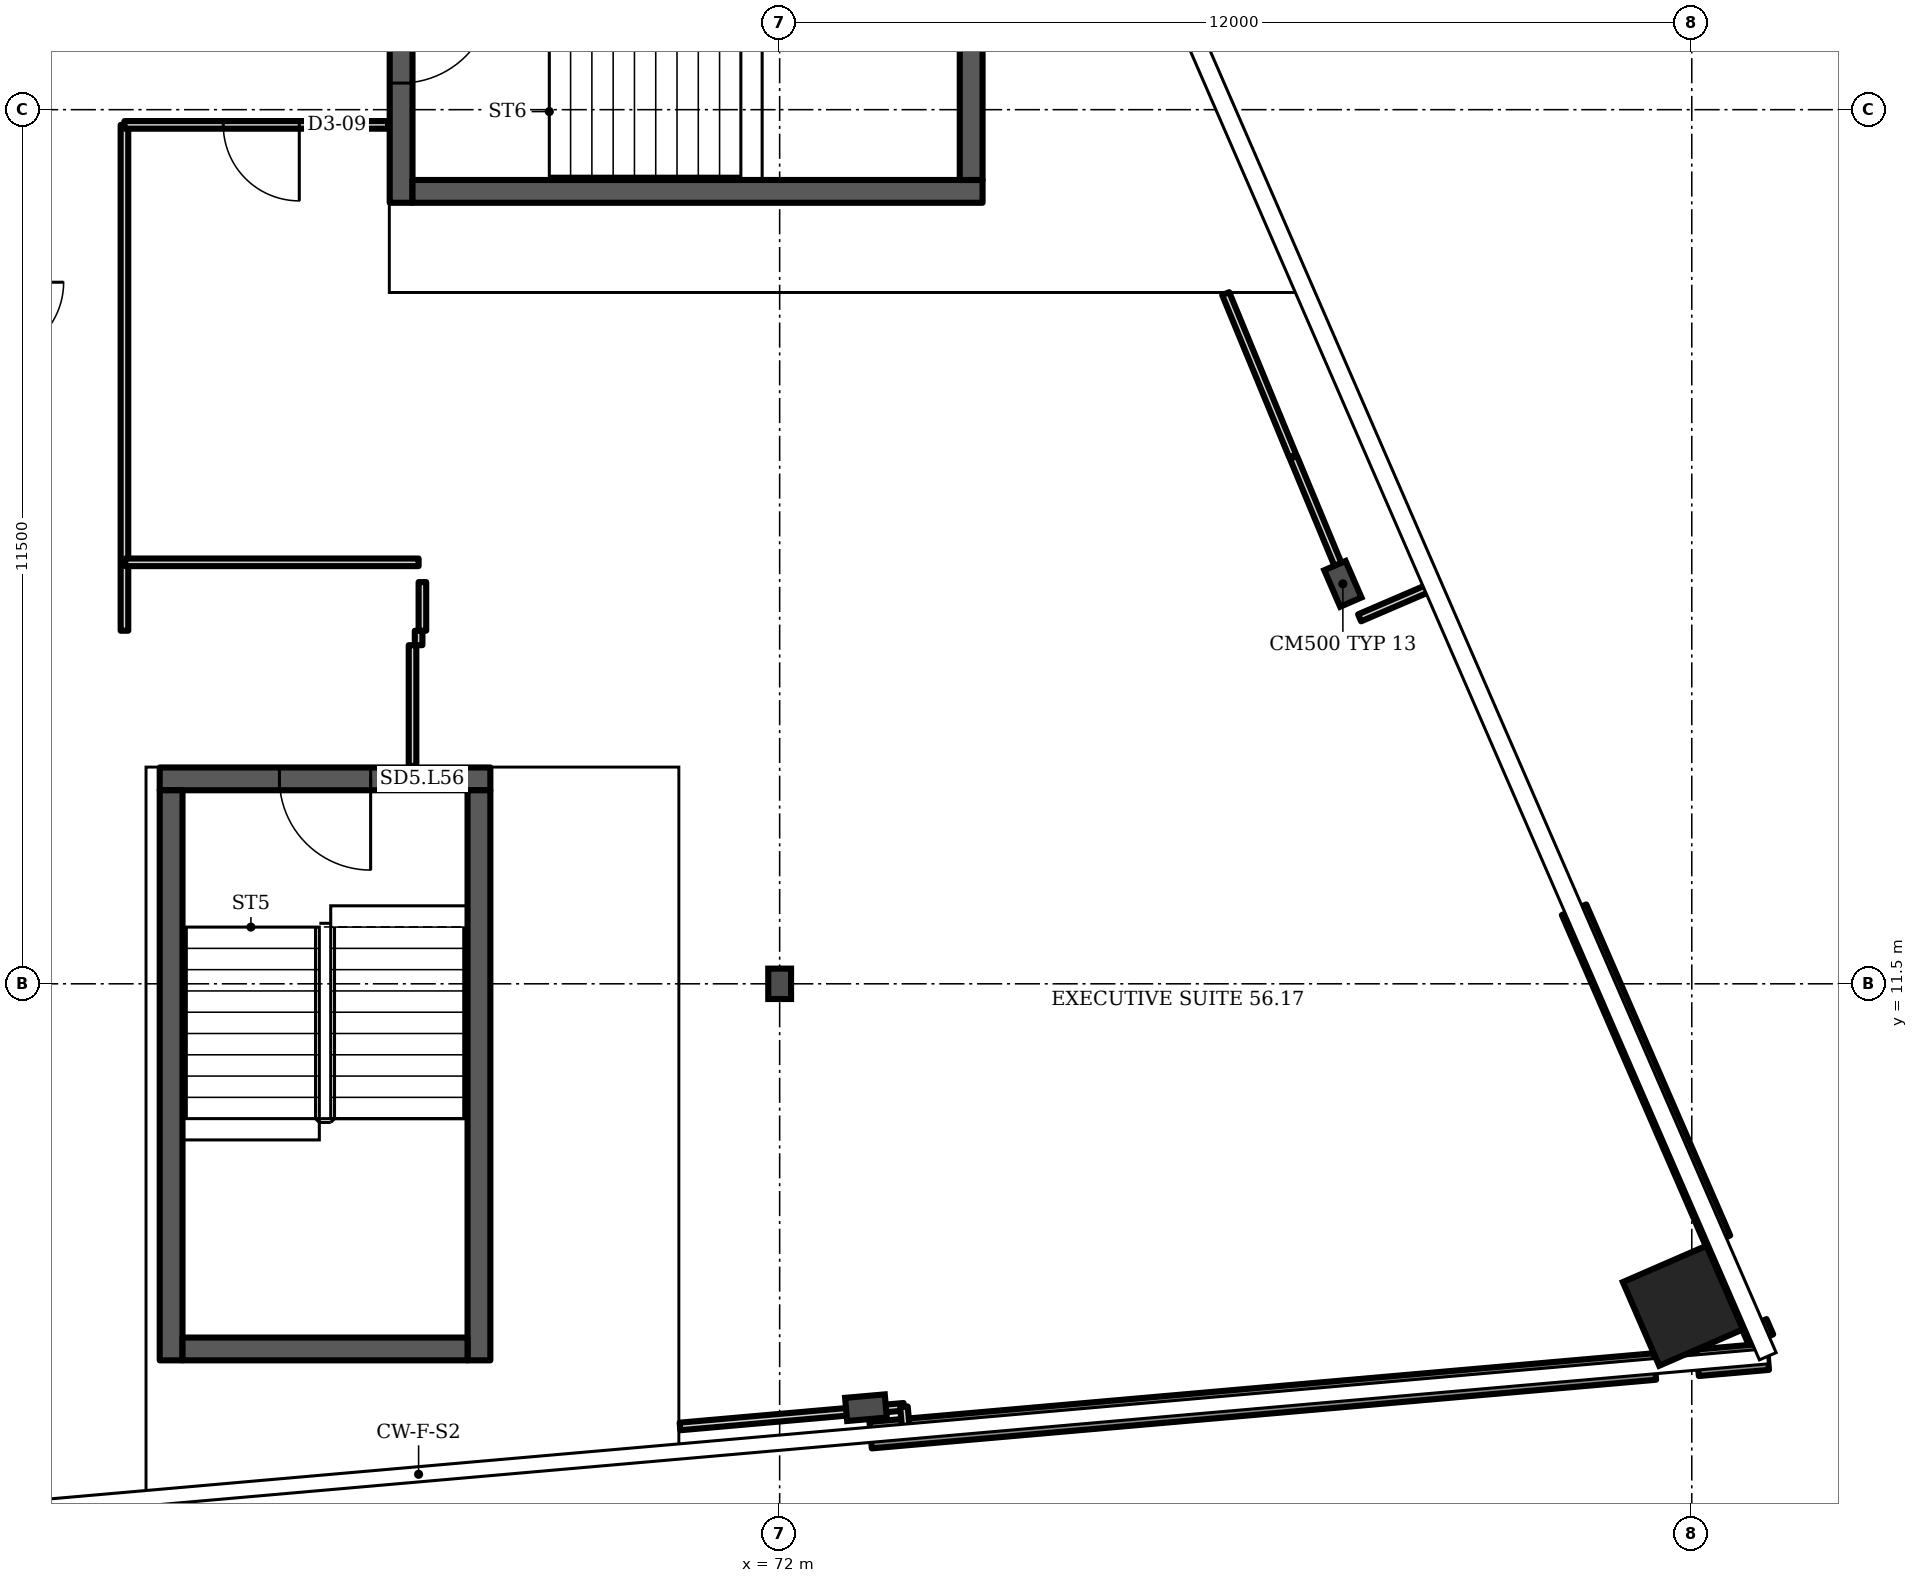
"""IFC4 building model, lengths in metres.
Left out: names, types, materials, properties, quantities, classifications, styles, units other than length and angle.
Written with IfcOpenShell. Run it as: python <this file> out.ifc"""

import sys

from ifc_helpers import new_model, si_unit, direction, frame, frame_2d, origin, origin_2d, place, context, subcontext, project, spatial, rectangle, i_section, extrude, element, fill, save


model = new_model("IFC4")
c1 = context("Model", 3, precision=1e-05, world=origin(), true_north=direction((0.0, 1.0)))
c2 = subcontext(c1, "Body", "Model", "MODEL_VIEW")
j1 = project(units=[si_unit("LENGTHUNIT", "METRE"), si_unit("PLANEANGLEUNIT", "RADIAN")], contexts=[c1])
p1 = place(None, origin())
s1 = spatial("IfcSite", under=j1, at=p1, CompositionType="ELEMENT")
p2 = place(p1, origin())
s2 = spatial("IfcBuilding", under=s1, at=p2, CompositionType="ELEMENT")
p3 = place(p2, frame((0.0, 0.0, 225.1)))
s3 = spatial("IfcBuildingStorey", under=s2, at=p3, CompositionType="ELEMENT", Elevation=225.1)
p4 = place(p3, frame((83.883, 7.265, 0.0), z_axis=(0.0, 0.0, 1.0), x_axis=(-0.398727, 0.917072, 0.0)))
e1 = element("IfcColumn", 1, at=p4, inside=s3, PredefinedType="COLUMN", context=c2, shape_type="SweptSolid", body=[
    extrude(rectangle(XDim=1.2, YDim=1.2, at=origin_2d()), origin(), (0.0, 0.0, 1.0), 3.6),
])
for number, where, z_axis, x_axis in (
    (2, (73.135, 5.923, 0.0), (0.0, 0.0, 1.0), (0.087, -0.996, 0.0)),
    (3, (79.41, 16.762, 0.0), (0.0, 0.0, 1.0), (0.917, 0.399, 0.0)),
):
    element("IfcColumn", number, at=place(p3, frame(where, z_axis=z_axis, x_axis=x_axis)), inside=s3, PredefinedType="COLUMN", context=c2, shape_type="SweptSolid", body=[
        extrude(i_section(OverallWidth=0.306, OverallDepth=0.524, WebThickness=0.021, FlangeThickness=0.04, FilletRadius=0.027, at=origin_2d()), origin(), (0.0, 0.0, 1.0), 3.6),
    ])
p5 = place(p3, frame((72.0, 11.5, 0.0), z_axis=(0.0, 0.0, 1.0), x_axis=(1.0, 0.0, 0.0)))
e4 = element("IfcColumn", 4, at=p5, inside=s3, PredefinedType="COLUMN", context=c2, shape_type="SweptSolid", body=[
    extrude(i_section(OverallWidth=0.3, OverallDepth=0.4, WebThickness=0.013, FlangeThickness=0.024, FilletRadius=0.027, at=origin_2d()), origin(), (0.0, 0.0, 1.0), 3.6),
])
p6 = place(p3, frame((73.197, 5.562, 0.0), z_axis=(0.0, 0.0, 1.0), x_axis=(0.996198, 0.087163, 0.0)))
e5 = element("IfcWall", 5, at=p6, inside=s3, PredefinedType="SOLIDWALL", context=c2, shape_type="SweptSolid", body=[
    extrude(rectangle(XDim=10.358, YDim=0.35, at=frame_2d((5.179, 0.0))), origin(), (0.0, 0.0, 1.0), 1.0),
])
p7 = place(p3, frame((84.078, 6.514, 0.0), z_axis=(0.0, 0.0, 1.0), x_axis=(0.996213, 0.086971, 0.0)))
e6 = element("IfcWall", 6, at=p7, inside=s3, PredefinedType="SOLIDWALL", context=c2, shape_type="SweptSolid", body=[
    extrude(rectangle(XDim=0.926, YDim=0.35, at=frame_2d((0.463, 0.0))), origin(), (0.0, 0.0, 1.0), 1.0),
])
p8 = place(p3, frame((84.91, 6.819, 0.0), z_axis=(0.0, 0.0, 1.0), x_axis=(-0.398359, 0.91723, 0.0)))
e7 = element("IfcWall", 7, at=p8, inside=s3, PredefinedType="SOLIDWALL", context=c2, shape_type="SweptSolid", body=[
    extrude(rectangle(XDim=0.219, YDim=0.35, at=frame_2d((0.109, 0.0))), origin(), (0.0, 0.0, 1.0), 1.0),
])
p9 = place(p3, frame((84.345, 8.12, 0.0), z_axis=(0.0, 0.0, 1.0), x_axis=(-0.398736, 0.917067, 0.0)))
e8 = element("IfcWall", 8, at=p9, inside=s3, PredefinedType="SOLIDWALL", context=c2, shape_type="SweptSolid", body=[
    extrude(rectangle(XDim=4.748, YDim=0.35, at=frame_2d((2.374, 0.0))), origin(), (0.0, 0.0, 1.0), 1.0),
])
p10 = place(p3, frame((63.844, 14.196, 0.0), z_axis=(0.0, 0.0, 1.0), x_axis=(1.0, 0.0, 0.0)))
e9 = element("IfcWall", 9, at=p10, inside=s3, PredefinedType="SHEAR", context=c2, shape_type="SweptSolid", body=[
    extrude(rectangle(XDim=4.35, YDim=0.3, at=frame_2d((2.175, 0.0))), origin(), (0.0, 0.0, 1.0), 3.2),
])
p11 = place(p10, frame((1.575, 0.0, 0.0)))
e10 = element("IfcOpeningElement", 10, at=p11, cuts=e9, PredefinedType="OPENING", context=c2, shape_type="SweptSolid", body=[
    extrude(rectangle(XDim=1.2, YDim=2.1, at=frame_2d((0.6, 1.05))), frame((0.0, 0.16, 0.0), z_axis=(0.0, -1.0, 0.0), x_axis=(1.0, 0.0, 0.0)), (0.0, 0.0, 1.0), 0.32),
])
p12 = place(p3, frame((67.02, 21.775, 0.0), z_axis=(0.0, 0.0, 1.0), x_axis=(0.0, 1.0, 0.0)))
e11 = element("IfcWall", 11, at=p12, inside=s3, PredefinedType="SHEAR", context=c2, shape_type="SweptSolid", body=[
    extrude(rectangle(XDim=4.35, YDim=0.3, at=frame_2d((2.175, 0.0))), origin(), (0.0, 0.0, 1.0), 3.2),
])
p13 = place(p12, frame((1.575, 0.0, 0.0)))
e12 = element("IfcOpeningElement", 12, at=p13, cuts=e11, PredefinedType="OPENING", context=c2, shape_type="SweptSolid", body=[
    extrude(rectangle(XDim=1.2, YDim=2.1, at=frame_2d((0.6, 1.05))), frame((0.0, 0.16, 0.0), z_axis=(0.0, -1.0, 0.0), x_axis=(1.0, 0.0, 0.0)), (0.0, 0.0, 1.0), 0.32),
])
p14 = place(p3, frame((63.38, 16.145, 0.0), z_axis=(0.0, 0.0, 1.0), x_axis=(0.0, 1.0, 0.0)))
e13 = element("IfcWall", 13, at=p14, inside=s3, PredefinedType="PARTITIONING", context=c2, shape_type="SweptSolid", body=[
    extrude(rectangle(XDim=6.655, YDim=0.1, at=frame_2d((3.328, 0.0))), origin(), (0.0, 0.0, 1.0), 3.2),
])
p15 = place(p3, frame((63.38, 22.8, 0.0), z_axis=(0.0, 0.0, 1.0), x_axis=(1.0, 0.0, 0.0)))
e14 = element("IfcWall", 14, at=p15, inside=s3, PredefinedType="PARTITIONING", context=c2, shape_type="SweptSolid", body=[
    extrude(rectangle(XDim=3.47, YDim=0.1, at=frame_2d((1.735, 0.0))), origin(), (0.0, 0.0, 1.0), 3.2),
])
p16 = place(p15, frame((1.3, 0.0, 0.0)))
e15 = element("IfcOpeningElement", 15, at=p16, cuts=e14, PredefinedType="OPENING", context=c2, shape_type="SweptSolid", body=[
    extrude(rectangle(XDim=1.0, YDim=2.1, at=frame_2d((0.5, 1.05))), frame((0.0, 0.06, 0.0), z_axis=(0.0, -1.0, 0.0), x_axis=(1.0, 0.0, 0.0)), (0.0, 0.0, 1.0), 0.12),
])
p17 = place(p3, frame((63.39, 17.045, 0.0), z_axis=(0.0, 0.0, 1.0), x_axis=(1.0, 0.0, 0.0)))
e16 = element("IfcWall", 16, at=p17, inside=s3, PredefinedType="PARTITIONING", context=c2, shape_type="SweptSolid", body=[
    extrude(rectangle(XDim=3.86, YDim=0.1, at=frame_2d((1.93, 0.0))), origin(), (0.0, 0.0, 1.0), 3.2),
])
p18 = place(p3, frame((67.17, 14.366, 0.0), z_axis=(0.0, 0.0, 1.0), x_axis=(0.0, 1.0, 0.0)))
e17 = element("IfcWall", 17, at=p18, inside=s3, PredefinedType="PARTITIONING", context=c2, shape_type="SweptSolid", body=[
    extrude(rectangle(XDim=1.589, YDim=0.1, at=frame_2d((0.794, 0.0))), origin(), (0.0, 0.0, 1.0), 3.2),
])
p19 = place(p3, frame((67.25, 15.955, 0.0), z_axis=(0.0, 0.0, 1.0), x_axis=(0.0, 1.0, 0.0)))
e18 = element("IfcWall", 18, at=p19, inside=s3, PredefinedType="PARTITIONING", context=c2, shape_type="SweptSolid", body=[
    extrude(rectangle(XDim=0.19, YDim=0.1, at=frame_2d((0.095, 0.0))), origin(), (0.0, 0.0, 1.0), 3.2),
])
p20 = place(p3, frame((67.3, 16.145, 0.0), z_axis=(0.0, 0.0, 1.0), x_axis=(0.0, 1.0, 0.0)))
e19 = element("IfcWall", 19, at=p20, inside=s3, PredefinedType="PARTITIONING", context=c2, shape_type="SweptSolid", body=[
    extrude(rectangle(XDim=0.64, YDim=0.1, at=frame_2d((0.32, 0.0))), origin(), (0.0, 0.0, 1.0), 3.2),
])
p21 = place(p3, frame((70.689, 5.677, 0.0), z_axis=(0.0, 0.0, 1.0), x_axis=(0.996174, 0.087417, 0.0)))
e20 = element("IfcWall", 20, at=p21, inside=s3, PredefinedType="PARTITIONING", context=c2, shape_type="SweptSolid", body=[
    extrude(rectangle(XDim=2.958, YDim=0.1, at=frame_2d((1.479, 0.0))), origin(), (0.0, 0.0, 1.0), 2.58),
])
p22 = place(p3, frame((73.663, 5.628, 0.0), z_axis=(0.0, 0.0, 1.0), x_axis=(-0.091893, 0.995772, 0.0)))
e21 = element("IfcWall", 21, at=p22, inside=s3, PredefinedType="PARTITIONING", context=c2, shape_type="SweptSolid", body=[
    extrude(rectangle(XDim=0.308, YDim=0.1, at=frame_2d((0.154, 0.0))), origin(), (0.0, 0.0, 1.0), 3.2),
])
p23 = place(p3, frame((78.75, 18.445, 0.0), z_axis=(0.0, 0.0, 1.0), x_axis=(-0.381663, 0.924299, 0.0)))
e22 = element("IfcWall", 22, at=p23, inside=s3, PredefinedType="PARTITIONING", context=c2, shape_type="SweptSolid", body=[
    extrude(rectangle(XDim=2.31, YDim=0.1, at=frame_2d((1.155, 0.0))), origin(), (0.0, 0.0, 1.0), 3.2),
])
p24 = place(p3, frame((79.35, 17.005, 0.0), z_axis=(0.0, 0.0, 1.0), x_axis=(-0.383703, 0.923459, 0.0)))
e23 = element("IfcWall", 23, at=p24, inside=s3, PredefinedType="PARTITIONING", context=c2, shape_type="SweptSolid", body=[
    extrude(rectangle(XDim=1.538, YDim=0.1, at=frame_2d((0.769, 0.0))), origin(), (0.0, 0.0, 1.0), 3.2),
])
p25 = place(p3, frame((79.63, 16.315, 0.0), z_axis=(0.0, 0.0, 1.0), x_axis=(0.918616, 0.395147, 0.0)))
e24 = element("IfcWall", 24, at=p25, inside=s3, PredefinedType="PARTITIONING", context=c2, shape_type="SweptSolid", body=[
    extrude(rectangle(XDim=1.031, YDim=0.1, at=frame_2d((0.516, 0.0))), origin(), (0.0, 0.0, 1.0), 2.58),
])
for number, where, z_axis, x_axis in (
    (25, (63.994, 6.546, 0.0), (0.0, 0.0, 1.0), (0.0, 1.0, 0.0)),
    (26, (68.044, 6.546, 0.0), (0.0, 0.0, 1.0), (0.0, 1.0, 0.0)),
):
    element("IfcWall", number, at=place(p3, frame(where, z_axis=z_axis, x_axis=x_axis)), inside=s3, PredefinedType="SHEAR", context=c2, shape_type="SweptSolid", body=[
        extrude(rectangle(XDim=7.5, YDim=0.3, at=frame_2d((3.75, 0.0))), origin(), (0.0, 0.0, 1.0), 3.2),
    ])
p26 = place(p3, frame((64.144, 6.696, 0.0), z_axis=(0.0, 0.0, 1.0), x_axis=(1.0, 0.0, 0.0)))
e27 = element("IfcWall", 27, at=p26, inside=s3, PredefinedType="SHEAR", context=c2, shape_type="SweptSolid", body=[
    extrude(rectangle(XDim=3.75, YDim=0.3, at=frame_2d((1.875, 0.0))), origin(), (0.0, 0.0, 1.0), 3.2),
])
p27 = place(p3, frame((67.17, 21.925, 0.0), z_axis=(0.0, 0.0, 1.0), x_axis=(1.0, 0.0, 0.0)))
e28 = element("IfcWall", 28, at=p27, inside=s3, PredefinedType="SHEAR", context=c2, shape_type="SweptSolid", body=[
    extrude(rectangle(XDim=7.5, YDim=0.3, at=frame_2d((3.75, 0.0))), origin(), (0.0, 0.0, 1.0), 3.2),
])
p28 = place(p3, frame((74.52, 22.075, 0.0), z_axis=(0.0, 0.0, 1.0), x_axis=(0.0, 1.0, 0.0)))
e29 = element("IfcWall", 29, at=p28, inside=s3, PredefinedType="SHEAR", context=c2, shape_type="SweptSolid", body=[
    extrude(rectangle(XDim=3.75, YDim=0.3, at=frame_2d((1.875, 0.0))), origin(), (0.0, 0.0, 1.0), 3.2),
])
p29 = place(p11, origin())
e30 = element("IfcDoor", 30, at=p29, inside=s3, OperationType="SINGLE_SWING_RIGHT", PredefinedType="DOOR", context=c2, shape_type="SweptSolid", body=[
    extrude(rectangle(XDim=1.2, YDim=2.1, at=frame_2d((0.6, 1.05))), frame((0.0, 0.025, 0.0), z_axis=(0.0, -1.0, 0.0), x_axis=(1.0, 0.0, 0.0)), (0.0, 0.0, 1.0), 0.05),
])
fill(e10, e30)
p30 = place(p13, origin())
e31 = element("IfcDoor", 31, at=p30, inside=s3, OperationType="SINGLE_SWING_RIGHT", PredefinedType="DOOR", context=c2, shape_type="SweptSolid", body=[
    extrude(rectangle(XDim=1.2, YDim=2.1, at=frame_2d((0.6, 1.05))), frame((0.0, 0.025, 0.0), z_axis=(0.0, -1.0, 0.0), x_axis=(1.0, 0.0, 0.0)), (0.0, 0.0, 1.0), 0.05),
])
fill(e12, e31)
p31 = place(p16, origin())
e32 = element("IfcDoor", 32, at=p31, inside=s3, OperationType="SINGLE_SWING_RIGHT", PredefinedType="DOOR", context=c2, shape_type="SweptSolid", body=[
    extrude(rectangle(XDim=1.0, YDim=2.1, at=frame_2d((0.5, 1.05))), frame((0.0, 0.025, 0.0), z_axis=(0.0, -1.0, 0.0), x_axis=(1.0, 0.0, 0.0)), (0.0, 0.0, 1.0), 0.05),
])
fill(e15, e32)
save(model, sys.argv[1])
